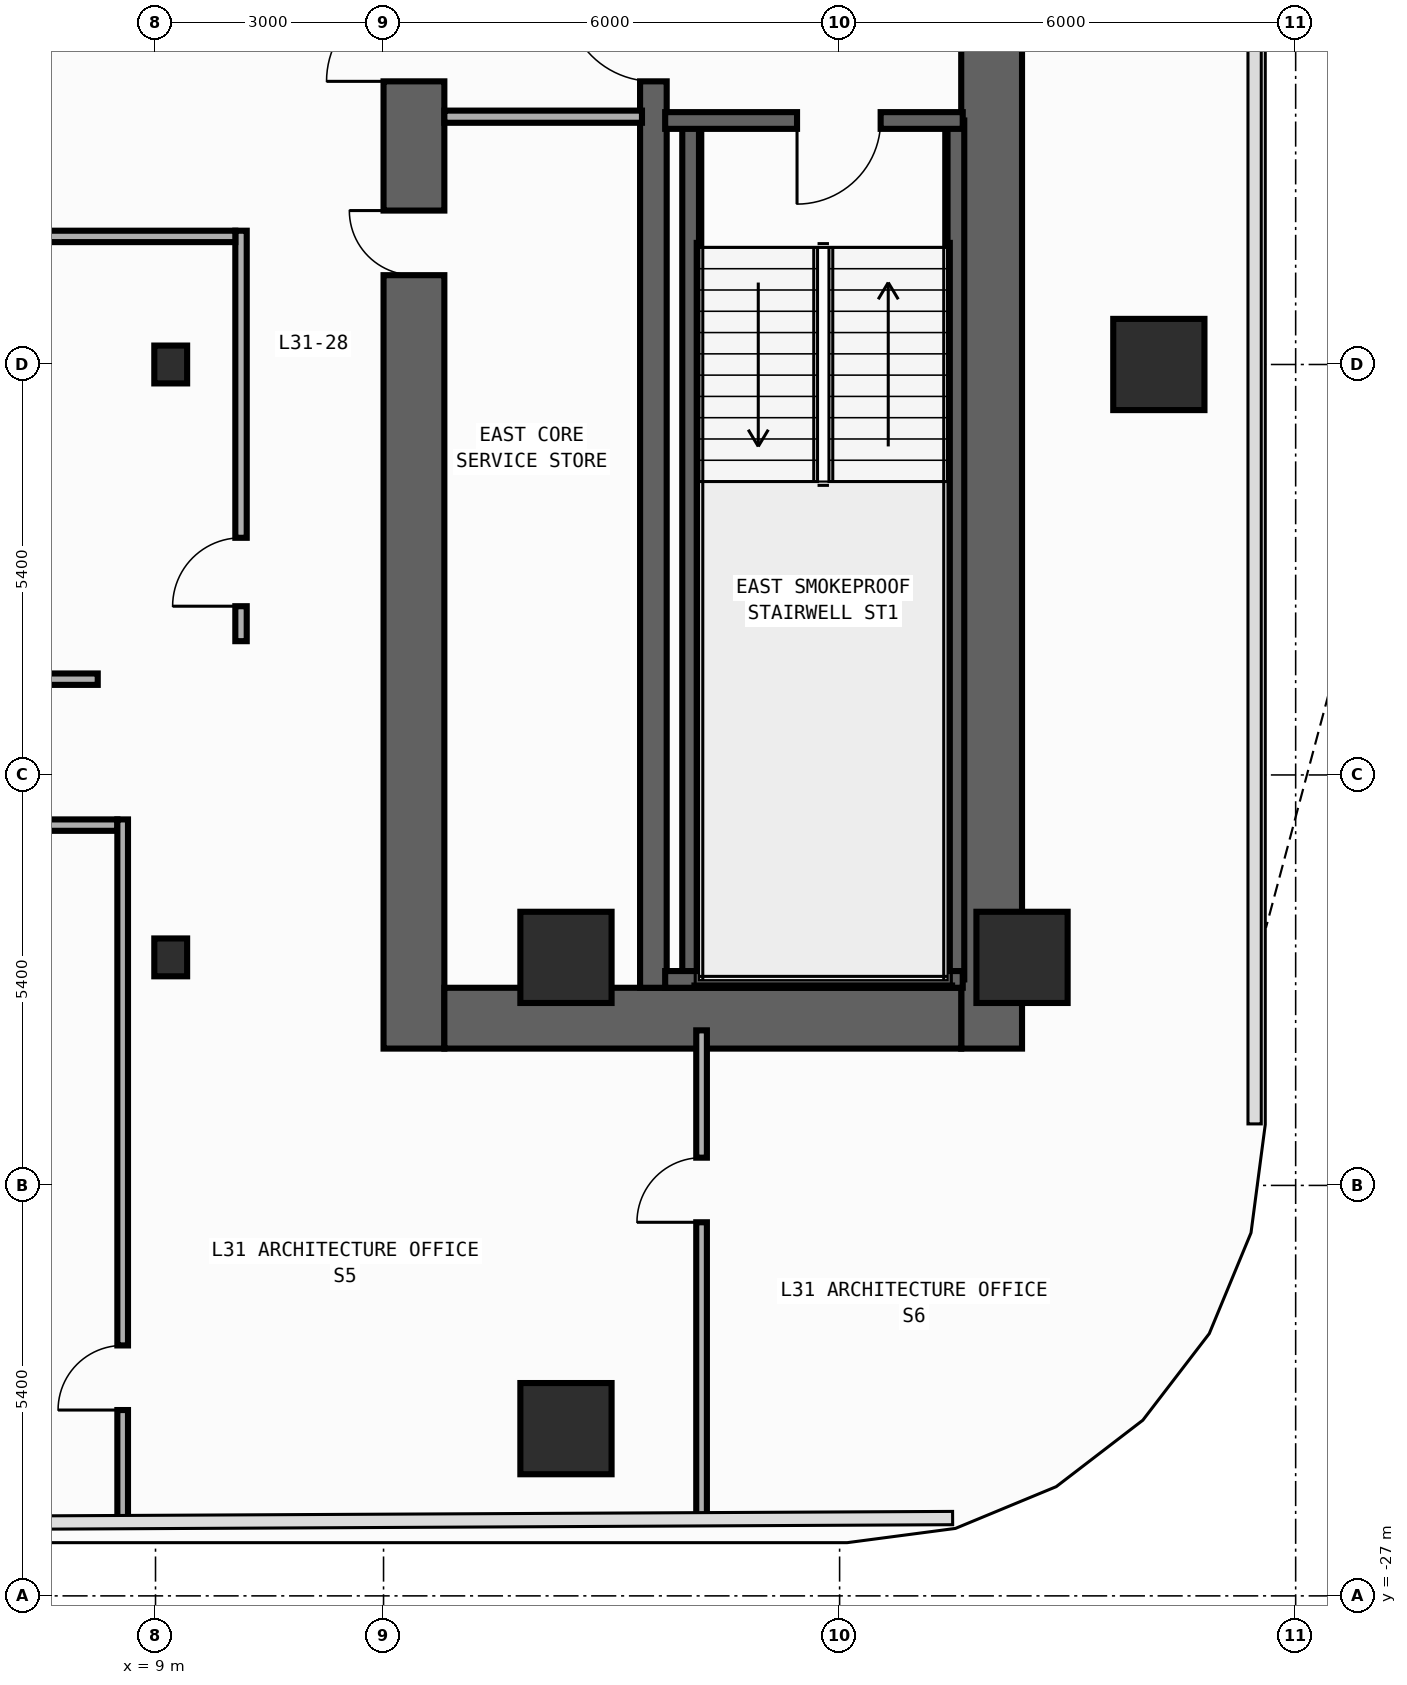
"""IFC4 building model, lengths in metres.
Left out: names, types, materials, properties, quantities, classifications, styles, units other than length and angle.
Written with IfcOpenShell. Run it as: python <this file> out.ifc"""

import sys

from ifc_helpers import new_model, si_unit, direction, frame, frame_2d, origin, origin_2d, place, context, subcontext, project, spatial, rectangle, i_section, extrude, element, fill, save


model = new_model("IFC4")
c1 = context("Model", 3, precision=1e-05, world=origin(), true_north=direction((0.0, 1.0)))
c2 = subcontext(c1, "Body", "Model", "MODEL_VIEW")
j1 = project(units=[si_unit("LENGTHUNIT", "METRE"), si_unit("PLANEANGLEUNIT", "RADIAN")], contexts=[c1])
p1 = place(None, origin())
s1 = spatial("IfcSite", under=j1, at=p1, CompositionType="ELEMENT")
p2 = place(p1, origin())
s2 = spatial("IfcBuilding", under=s1, at=p2, CompositionType="ELEMENT")
p3 = place(p2, frame((0.0, 0.0, 135.2)))
s3 = spatial("IfcBuildingStorey", under=s2, at=p3, CompositionType="ELEMENT", Elevation=135.2)
p4 = place(p3, frame((12.4, -19.8, 0.0), z_axis=(0.0, 0.0, 1.0), x_axis=(0.0, 1.0, 0.0)))
e1 = element("IfcWall", 1, at=p4, inside=s3, PredefinedType="SHEAR", context=c2, shape_type="SweptSolid", body=[
    extrude(rectangle(XDim=27.0, YDim=0.8, at=frame_2d((13.5, 0.0))), origin(), (0.0, 0.0, 1.0), 3.94),
])
p5 = place(p4, frame((23.05, 0.0, 0.0)))
e2 = element("IfcOpeningElement", 2, at=p5, cuts=e1, PredefinedType="OPENING", context=c2, shape_type="SweptSolid", body=[
    extrude(rectangle(XDim=1.1, YDim=2.2, at=frame_2d((0.55, 1.1))), frame((0.0, 0.41, 0.0), z_axis=(0.0, -1.0, 0.0), x_axis=(1.0, 0.0, 0.0)), (0.0, 0.0, 1.0), 0.82),
])
p6 = place(p4, frame((19.85, 0.0, 0.0)))
e3 = element("IfcOpeningElement", 3, at=p6, cuts=e1, PredefinedType="OPENING", context=c2, shape_type="SweptSolid", body=[
    extrude(rectangle(XDim=1.1, YDim=2.2, at=frame_2d((0.55, 1.1))), frame((0.0, 0.41, 0.0), z_axis=(0.0, -1.0, 0.0), x_axis=(1.0, 0.0, 0.0)), (0.0, 0.0, 1.0), 0.82),
])
p7 = place(p4, frame((16.65, 0.0, 0.0)))
e4 = element("IfcOpeningElement", 4, at=p7, cuts=e1, PredefinedType="OPENING", context=c2, shape_type="SweptSolid", body=[
    extrude(rectangle(XDim=1.1, YDim=2.2, at=frame_2d((0.55, 1.1))), frame((0.0, 0.41, 0.0), z_axis=(0.0, -1.0, 0.0), x_axis=(1.0, 0.0, 0.0)), (0.0, 0.0, 1.0), 0.82),
])
p8 = place(p4, frame((10.175, 0.0, 0.0)))
e5 = element("IfcOpeningElement", 5, at=p8, cuts=e1, PredefinedType="OPENING", context=c2, shape_type="SweptSolid", body=[
    extrude(rectangle(XDim=0.85, YDim=2.1, at=frame_2d((0.425, 1.05))), frame((0.0, 0.41, 0.0), z_axis=(0.0, -1.0, 0.0), x_axis=(1.0, 0.0, 0.0)), (0.0, 0.0, 1.0), 0.82),
])
p9 = place(p4, frame((12.725, 0.0, 0.0)))
e6 = element("IfcOpeningElement", 6, at=p9, cuts=e1, PredefinedType="OPENING", context=c2, shape_type="SweptSolid", body=[
    extrude(rectangle(XDim=1.15, YDim=2.2, at=frame_2d((0.575, 1.1))), frame((0.0, 0.41, 0.0), z_axis=(0.0, -1.0, 0.0), x_axis=(1.0, 0.0, 0.0)), (0.0, 0.0, 1.0), 0.82),
])
p10 = place(p4, frame((25.125, 0.0, 0.0)))
e7 = element("IfcOpeningElement", 7, at=p10, cuts=e1, PredefinedType="OPENING", context=c2, shape_type="SweptSolid", body=[
    extrude(rectangle(XDim=0.85, YDim=2.1, at=frame_2d((0.425, 1.05))), frame((0.0, 0.41, 0.0), z_axis=(0.0, -1.0, 0.0), x_axis=(1.0, 0.0, 0.0)), (0.0, 0.0, 1.0), 0.82),
])
p11 = place(p3, frame((20.0, -19.8, 0.0), z_axis=(0.0, 0.0, 1.0), x_axis=(0.0, 1.0, 0.0)))
e8 = element("IfcWall", 8, at=p11, inside=s3, PredefinedType="SHEAR", context=c2, shape_type="SweptSolid", body=[
    extrude(rectangle(XDim=27.0, YDim=0.8, at=frame_2d((13.5, 0.0))), origin(), (0.0, 0.0, 1.0), 3.94),
])
p12 = place(p3, frame((12.8, -19.4, 0.0), z_axis=(0.0, 0.0, 1.0), x_axis=(1.0, 0.0, 0.0)))
e9 = element("IfcWall", 9, at=p12, inside=s3, PredefinedType="SHEAR", context=c2, shape_type="SweptSolid", body=[
    extrude(rectangle(XDim=6.8, YDim=0.8, at=frame_2d((3.4, 0.0))), origin(), (0.0, 0.0, 1.0), 3.94),
])
p13 = place(p3, frame((15.55, -19.0, 0.0), z_axis=(0.0, 0.0, 1.0), x_axis=(0.0, 1.0, 0.0)))
e10 = element("IfcWall", 10, at=p13, inside=s3, PredefinedType="SHEAR", context=c2, shape_type="SweptSolid", body=[
    extrude(rectangle(XDim=25.4, YDim=0.35, at=frame_2d((12.7, 0.0))), origin(), (0.0, 0.0, 1.0), 3.94),
])
p14 = place(p13, frame((11.925, 0.0, 0.0)))
e11 = element("IfcOpeningElement", 11, at=p14, cuts=e10, PredefinedType="OPENING", context=c2, shape_type="SweptSolid", body=[
    extrude(rectangle(XDim=1.15, YDim=2.2, at=frame_2d((0.575, 1.1))), frame((0.0, 0.185, 0.0), z_axis=(0.0, -1.0, 0.0), x_axis=(1.0, 0.0, 0.0)), (0.0, 0.0, 1.0), 0.37),
])
p15 = place(p13, frame((24.325, 0.0, 0.0)))
e12 = element("IfcOpeningElement", 12, at=p15, cuts=e10, PredefinedType="OPENING", context=c2, shape_type="SweptSolid", body=[
    extrude(rectangle(XDim=0.85, YDim=2.1, at=frame_2d((0.425, 1.05))), frame((0.0, 0.185, 0.0), z_axis=(0.0, -1.0, 0.0), x_axis=(1.0, 0.0, 0.0)), (0.0, 0.0, 1.0), 0.37),
])
for number, where, z_axis, x_axis in (
    (13, (16.04, -18.89, 0.0), (0.0, 0.0, 1.0), (0.0, 1.0, 0.0)),
    (14, (19.53, -18.89, 0.0), (0.0, 0.0, 1.0), (0.0, 1.0, 0.0)),
):
    element("IfcWall", number, at=place(p3, frame(where, z_axis=z_axis, x_axis=x_axis)), inside=s3, PredefinedType="SHEAR", context=c2, shape_type="SweptSolid", body=[
        extrude(rectangle(XDim=11.3, YDim=0.22, at=frame_2d((5.65, 0.0))), origin(), (0.0, 0.0, 1.0), 3.94),
    ])
p16 = place(p3, frame((15.705, -18.89, 0.0), z_axis=(0.0, 0.0, 1.0), x_axis=(1.0, 0.0, 0.0)))
e15 = element("IfcWall", 15, at=p16, inside=s3, PredefinedType="SHEAR", context=c2, shape_type="SweptSolid", body=[
    extrude(rectangle(XDim=3.915, YDim=0.22, at=frame_2d((1.958, 0.0))), origin(), (0.0, 0.0, 1.0), 3.94),
])
p17 = place(p3, frame((19.62, -7.59, 0.0), z_axis=(0.0, 0.0, 1.0), x_axis=(-1.0, 0.0, 0.0)))
e16 = element("IfcWall", 16, at=p17, inside=s3, PredefinedType="SHEAR", context=c2, shape_type="SweptSolid", body=[
    extrude(rectangle(XDim=3.915, YDim=0.22, at=frame_2d((1.958, 0.0))), origin(), (0.0, 0.0, 1.0), 3.94),
])
p18 = place(p17, frame((1.08, 0.0, 0.0)))
e17 = element("IfcOpeningElement", 17, at=p18, cuts=e16, PredefinedType="OPENING", context=c2, shape_type="SweptSolid", body=[
    extrude(rectangle(XDim=1.1, YDim=2.2, at=frame_2d((0.55, 1.1))), frame((0.0, 0.12, 0.0), z_axis=(0.0, -1.0, 0.0), x_axis=(1.0, 0.0, 0.0)), (0.0, 0.0, 1.0), 0.24),
])
for number, where, z_axis, x_axis in (
    (18, (9.2, -18.6, 0.0), (0.0, 0.0, 1.0), (1.0, 0.0, 0.0)),
    (19, (9.2, -10.8, 0.0), (0.0, 0.0, 1.0), (1.0, 0.0, 0.0)),
):
    element("IfcColumn", number, at=place(p3, frame(where, z_axis=z_axis, x_axis=x_axis)), inside=s3, PredefinedType="COLUMN", context=c2, shape_type="SweptSolid", body=[
        extrude(i_section(OverallWidth=0.432, OverallDepth=0.498, WebThickness=0.045, FlangeThickness=0.07, FilletRadius=0.022, at=origin_2d()), origin(), (0.0, 0.0, 1.0), 4.2),
    ])
for number, where, z_axis, x_axis in (
    (20, (20.4, -18.6, 0.0), (0.0, 0.0, 1.0), (1.0, 0.0, 0.0)),
    (21, (14.4, -18.6, 0.0), (0.0, 0.0, 1.0), (1.0, 0.0, 0.0)),
    (22, (22.2, -10.8, 0.0), (0.0, 0.0, 1.0), (1.0, 0.0, 0.0)),
    (23, (14.4, -24.8, 0.0), (0.0, 0.0, 1.0), (1.0, 0.0, 0.0)),
):
    element("IfcColumn", number, at=place(p3, frame(where, z_axis=z_axis, x_axis=x_axis)), inside=s3, PredefinedType="COLUMN", context=c2, shape_type="SweptSolid", body=[
        extrude(rectangle(XDim=1.2, YDim=1.2, at=origin_2d()), origin(), (0.0, 0.0, 1.0), 4.2),
    ])
p19 = place(p3, frame((12.8, -7.54, 0.0), z_axis=(0.0, 0.0, 1.0), x_axis=(1.0, 0.0, 0.0)))
e24 = element("IfcWall", 24, at=p19, inside=s3, PredefinedType="STANDARD", context=c2, shape_type="SweptSolid", body=[
    extrude(rectangle(XDim=2.6, YDim=0.16, at=frame_2d((1.3, 0.0))), origin(), (0.0, 0.0, 1.0), 3.94),
])
p20 = place(p3, frame((10.125, -14.44, 0.0), z_axis=(0.0, 0.0, 1.0), x_axis=(0.0, 1.0, 0.0)))
e25 = element("IfcWall", 25, at=p20, inside=s3, PredefinedType="PARTITIONING", context=c2, shape_type="SweptSolid", body=[
    extrude(rectangle(XDim=5.4, YDim=0.15, at=frame_2d((2.7, 0.0))), origin(), (0.0, 0.0, 1.0), 3.94),
])
p21 = place(p20, frame((0.46, 0.0, 0.0)))
e26 = element("IfcOpeningElement", 26, at=p21, cuts=e25, PredefinedType="OPENING", context=c2, shape_type="SweptSolid", body=[
    extrude(rectangle(XDim=0.9, YDim=2.15, at=frame_2d((0.45, 1.075))), frame((0.0, 0.085, 0.0), z_axis=(0.0, -1.0, 0.0), x_axis=(1.0, 0.0, 0.0)), (0.0, 0.0, 1.0), 0.17),
])
p22 = place(p3, frame((-0.015, -9.115, 0.0), z_axis=(0.0, 0.0, 1.0), x_axis=(1.0, 0.0, 0.0)))
e27 = element("IfcWall", 27, at=p22, inside=s3, PredefinedType="PARTITIONING", context=c2, shape_type="SweptSolid", body=[
    extrude(rectangle(XDim=10.065, YDim=0.15, at=frame_2d((5.032, 0.0))), origin(), (0.0, 0.0, 1.0), 3.94),
])
p23 = place(p22, frame((0.46, 0.0, 0.0)))
e28 = element("IfcOpeningElement", 28, at=p23, cuts=e27, PredefinedType="OPENING", context=c2, shape_type="SweptSolid", body=[
    extrude(rectangle(XDim=0.9, YDim=2.15, at=frame_2d((0.45, 1.075))), frame((0.0, 0.085, 0.0), z_axis=(0.0, -1.0, 0.0), x_axis=(1.0, 0.0, 0.0)), (0.0, 0.0, 1.0), 0.17),
])
p24 = place(p3, frame((0.952, -16.86, 0.0), z_axis=(0.0, 0.0, 1.0), x_axis=(1.0, 0.0, 0.0)))
e29 = element("IfcWall", 29, at=p24, inside=s3, PredefinedType="PARTITIONING", context=c2, shape_type="SweptSolid", body=[
    extrude(rectangle(XDim=7.546, YDim=0.15, at=frame_2d((3.773, 0.0))), origin(), (0.0, 0.0, 1.0), 3.94),
])
p25 = place(p24, frame((5.726, 0.0, 0.0)))
e30 = element("IfcOpeningElement", 30, at=p25, cuts=e29, PredefinedType="OPENING", context=c2, shape_type="SweptSolid", body=[
    extrude(rectangle(XDim=0.9, YDim=2.15, at=frame_2d((0.45, 1.075))), frame((0.0, 0.085, 0.0), z_axis=(0.0, -1.0, 0.0), x_axis=(1.0, 0.0, 0.0)), (0.0, 0.0, 1.0), 0.17),
])
p26 = place(p3, frame((-0.015, -14.94, 0.0), z_axis=(0.0, 0.0, 1.0), x_axis=(1.0, 0.0, 0.0)))
e31 = element("IfcWall", 31, at=p26, inside=s3, PredefinedType="PARTITIONING", context=c2, shape_type="SweptSolid", body=[
    extrude(rectangle(XDim=8.255, YDim=0.15, at=frame_2d((4.127, 0.0))), origin(), (0.0, 0.0, 1.0), 3.94),
])
p27 = place(p26, frame((6.694, 0.0, 0.0)))
e32 = element("IfcOpeningElement", 32, at=p27, cuts=e31, PredefinedType="OPENING", context=c2, shape_type="SweptSolid", body=[
    extrude(rectangle(XDim=0.9, YDim=2.15, at=frame_2d((0.45, 1.075))), frame((0.0, 0.085, 0.0), z_axis=(0.0, -1.0, 0.0), x_axis=(1.0, 0.0, 0.0)), (0.0, 0.0, 1.0), 0.17),
])
p28 = place(p3, frame((8.568, -26.025, 0.0), z_axis=(0.0, 0.0, 1.0), x_axis=(0.0, 1.0, 0.0)))
e33 = element("IfcWall", 33, at=p28, inside=s3, PredefinedType="PARTITIONING", context=c2, shape_type="SweptSolid", body=[
    extrude(rectangle(XDim=9.24, YDim=0.14, at=frame_2d((4.62, 0.0))), origin(), (0.0, 0.0, 1.0), 3.94),
])
p29 = place(p28, frame((1.469, 0.0, 0.0)))
e34 = element("IfcOpeningElement", 34, at=p29, cuts=e33, PredefinedType="OPENING", context=c2, shape_type="SweptSolid", body=[
    extrude(rectangle(XDim=0.85, YDim=2.1, at=frame_2d((0.425, 1.05))), frame((0.0, 0.08, 0.0), z_axis=(0.0, -1.0, 0.0), x_axis=(1.0, 0.0, 0.0)), (0.0, 0.0, 1.0), 0.16),
])
p30 = place(p3, frame((16.184, -25.987, 0.0), z_axis=(0.0, 0.0, 1.0), x_axis=(0.0, 1.0, 0.0)))
e35 = element("IfcWall", 35, at=p30, inside=s3, PredefinedType="PARTITIONING", context=c2, shape_type="SweptSolid", body=[
    extrude(rectangle(XDim=6.427, YDim=0.14, at=frame_2d((3.214, 0.0))), origin(), (0.0, 0.0, 1.0), 3.94),
])
p31 = place(p30, frame((3.902, 0.0, 0.0)))
e36 = element("IfcOpeningElement", 36, at=p31, cuts=e35, PredefinedType="OPENING", context=c2, shape_type="SweptSolid", body=[
    extrude(rectangle(XDim=0.85, YDim=2.1, at=frame_2d((0.425, 1.05))), frame((0.0, 0.08, 0.0), z_axis=(0.0, -1.0, 0.0), x_axis=(1.0, 0.0, 0.0)), (0.0, 0.0, 1.0), 0.16),
])
p32 = place(p18, origin())
e37 = element("IfcDoor", 37, at=p32, inside=s3, OperationType="SINGLE_SWING_RIGHT", PredefinedType="DOOR", context=c2, shape_type="SweptSolid", body=[
    extrude(rectangle(XDim=1.1, YDim=2.2, at=frame_2d((0.55, 1.1))), frame((0.0, 0.025, 0.0), z_axis=(0.0, -1.0, 0.0), x_axis=(1.0, 0.0, 0.0)), (0.0, 0.0, 1.0), 0.05),
])
fill(e17, e37)
p33 = place(p8, origin())
e38 = element("IfcDoor", 38, at=p33, inside=s3, OperationType="SINGLE_SWING_RIGHT", PredefinedType="DOOR", context=c2, shape_type="SweptSolid", body=[
    extrude(rectangle(XDim=0.85, YDim=2.1, at=frame_2d((0.425, 1.05))), frame((0.0, 0.025, 0.0), z_axis=(0.0, -1.0, 0.0), x_axis=(1.0, 0.0, 0.0)), (0.0, 0.0, 1.0), 0.05),
])
fill(e5, e38)
p34 = place(p9, origin())
e39 = element("IfcDoor", 39, at=p34, inside=s3, OperationType="SINGLE_SWING_LEFT", PredefinedType="DOOR", context=c2, shape_type="SweptSolid", body=[
    extrude(rectangle(XDim=1.15, YDim=2.2, at=frame_2d((0.575, 1.1))), frame((0.0, 0.025, 0.0), z_axis=(0.0, -1.0, 0.0), x_axis=(1.0, 0.0, 0.0)), (0.0, 0.0, 1.0), 0.05),
])
fill(e6, e39)
p35 = place(p14, origin())
e40 = element("IfcDoor", 40, at=p35, inside=s3, OperationType="SINGLE_SWING_RIGHT", PredefinedType="DOOR", context=c2, shape_type="SweptSolid", body=[
    extrude(rectangle(XDim=1.15, YDim=2.2, at=frame_2d((0.575, 1.1))), frame((0.0, 0.025, 0.0), z_axis=(0.0, -1.0, 0.0), x_axis=(1.0, 0.0, 0.0)), (0.0, 0.0, 1.0), 0.05),
])
fill(e11, e40)
p36 = place(p21, origin())
e41 = element("IfcDoor", 41, at=p36, inside=s3, OperationType="SINGLE_SWING_LEFT", PredefinedType="DOOR", context=c2, shape_type="SweptSolid", body=[
    extrude(rectangle(XDim=0.9, YDim=2.15, at=frame_2d((0.45, 1.075))), frame((0.0, 0.025, 0.0), z_axis=(0.0, -1.0, 0.0), x_axis=(1.0, 0.0, 0.0)), (0.0, 0.0, 1.0), 0.05),
])
fill(e26, e41)
p37 = place(p29, origin())
e42 = element("IfcDoor", 42, at=p37, inside=s3, OperationType="SINGLE_SWING_LEFT", PredefinedType="DOOR", context=c2, shape_type="SweptSolid", body=[
    extrude(rectangle(XDim=0.85, YDim=2.1, at=frame_2d((0.425, 1.05))), frame((0.0, 0.025, 0.0), z_axis=(0.0, -1.0, 0.0), x_axis=(1.0, 0.0, 0.0)), (0.0, 0.0, 1.0), 0.05),
])
fill(e34, e42)
p38 = place(p31, origin())
e43 = element("IfcDoor", 43, at=p38, inside=s3, OperationType="SINGLE_SWING_LEFT", PredefinedType="DOOR", context=c2, shape_type="SweptSolid", body=[
    extrude(rectangle(XDim=0.85, YDim=2.1, at=frame_2d((0.425, 1.05))), frame((0.0, 0.025, 0.0), z_axis=(0.0, -1.0, 0.0), x_axis=(1.0, 0.0, 0.0)), (0.0, 0.0, 1.0), 0.05),
])
fill(e36, e43)
save(model, sys.argv[1])
